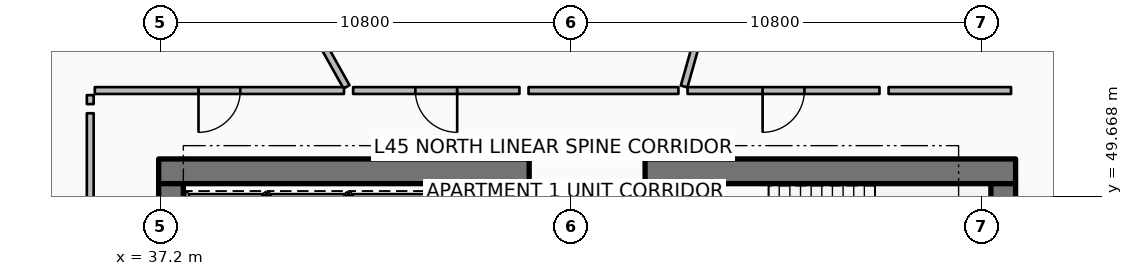
"""IFC4 building model, lengths in metres.
Left out: names, types, materials, properties, quantities, classifications, styles, units other than length and angle.
Written with IfcOpenShell. Run it as: python <this file> out.ifc"""

import sys

from ifc_helpers import new_model, si_unit, direction, frame, frame_2d, origin, place, context, subcontext, project, spatial, rectangle, extrude, element, fill, save


model = new_model("IFC4")
c1 = context("Model", 3, precision=1e-05, world=origin(), true_north=direction((0.0, 1.0)))
c2 = subcontext(c1, "Body", "Model", "MODEL_VIEW")
j1 = project(units=[si_unit("LENGTHUNIT", "METRE"), si_unit("PLANEANGLEUNIT", "RADIAN")], contexts=[c1])
p1 = place(None, origin())
s1 = spatial("IfcSite", under=j1, at=p1, CompositionType="ELEMENT")
p2 = place(p1, origin())
s2 = spatial("IfcBuilding", under=s1, at=p2, CompositionType="ELEMENT")
p3 = place(p2, frame((0.0, 0.0, 180.3)))
s3 = spatial("IfcBuildingStorey", under=s2, at=p3, CompositionType="ELEMENT", Elevation=180.3)
for number, where, z_axis, x_axis in (
    (1, (37.15, 50.325, 0.0), (0.0, 0.0, 1.0), (1.0, 0.0, 0.0)),
    (2, (49.95, 50.325, 0.0), (0.0, 0.0, 1.0), (1.0, 0.0, 0.0)),
):
    element("IfcWall", number, at=place(p3, frame(where, z_axis=z_axis, x_axis=x_axis)), inside=s3, PredefinedType="SHEAR", context=c2, shape_type="SweptSolid", body=[
        extrude(rectangle(XDim=9.75, YDim=0.65, at=frame_2d((4.875, 0.0))), origin(), (0.0, 0.0, 1.0), 3.75),
    ])
for number, where, z_axis, x_axis in (
    (3, (37.475, 34.0, 0.0), (0.0, 0.0, 1.0), (0.0, 1.0, 0.0)),
    (4, (59.375, 34.0, 0.0), (0.0, 0.0, 1.0), (0.0, 1.0, 0.0)),
):
    element("IfcWall", number, at=place(p3, frame(where, z_axis=z_axis, x_axis=x_axis)), inside=s3, PredefinedType="SHEAR", context=c2, shape_type="SweptSolid", body=[
        extrude(rectangle(XDim=16.0, YDim=0.65, at=frame_2d((8.0, 0.0))), origin(), (0.0, 0.0, 1.0), 3.75),
    ])
p4 = place(p3, frame((51.31, 46.5, 0.0), z_axis=(0.0, 0.0, 1.0), x_axis=(0.0, 1.0, 0.0)))
e5 = element("IfcWall", 5, at=p4, inside=s3, PredefinedType="SHEAR", context=c2, shape_type="SweptSolid", body=[
    extrude(rectangle(XDim=3.5, YDim=0.28, at=frame_2d((1.75, 0.0))), origin(), (0.0, 0.0, 1.0), 3.75),
])
for number, where, z_axis, x_axis in (
    (6, (39.975, 48.095, 0.0), (0.0, 0.0, 1.0), (0.0, 1.0, 0.0)),
    (7, (42.125, 48.095, 0.0), (0.0, 0.0, 1.0), (0.0, 1.0, 0.0)),
    (8, (44.275, 48.095, 0.0), (0.0, 0.0, 1.0), (0.0, 1.0, 0.0)),
):
    element("IfcWall", number, at=place(p3, frame(where, z_axis=z_axis, x_axis=x_axis)), inside=s3, PredefinedType="PARTITIONING", context=c2, shape_type="SweptSolid", body=[
        extrude(rectangle(XDim=1.61, YDim=0.16, at=frame_2d((0.805, 0.0))), origin(), (0.0, 0.0, 1.0), 3.5),
    ])
p5 = place(p3, frame((46.58, 48.045, 0.0), z_axis=(0.0, 0.0, 1.0), x_axis=(0.0, 1.0, 0.0)))
e9 = element("IfcWall", 9, at=p5, inside=s3, PredefinedType="PARTITIONING", context=c2, shape_type="SweptSolid", body=[
    extrude(rectangle(XDim=1.71, YDim=0.16, at=frame_2d((0.855, 0.0))), origin(), (0.0, 0.0, 1.0), 3.5),
])
p6 = place(p3, frame((50.977, 52.556, 0.0), z_axis=(0.0, 0.0, 1.0), x_axis=(0.271443307373, 0.962454430548, 0.0)))
e10 = element("IfcWall", 10, at=p6, inside=s3, PredefinedType="PARTITIONING", context=c2, shape_type="SweptSolid", body=[
    extrude(rectangle(XDim=13.759, YDim=0.18, at=frame_2d((6.88, 0.0))), origin(), (0.0, 0.0, 1.0), 2.94),
])
p7 = place(p3, frame((42.094, 52.546, 0.0), z_axis=(0.0, 0.0, 1.0), x_axis=(-0.488614041717, 0.872500039104, 0.0)))
e11 = element("IfcWall", 11, at=p7, inside=s3, PredefinedType="PARTITIONING", context=c2, shape_type="SweptSolid", body=[
    extrude(rectangle(XDim=10.448, YDim=0.18, at=frame_2d((5.224, 0.0))), origin(), (0.0, 0.0, 1.0), 2.94),
])
p8 = place(p3, frame((46.643, 52.45, 0.0), z_axis=(0.0, 0.0, 1.0), x_axis=(-1.0, 0.0, 0.0)))
e12 = element("IfcWall", 12, at=p8, inside=s3, PredefinedType="PARTITIONING", context=c2, shape_type="SweptSolid", body=[
    extrude(rectangle(XDim=4.376, YDim=0.18, at=frame_2d((2.188, 0.0))), origin(), (0.0, 0.0, 1.0), 2.94),
])
p9 = place(p8, frame((1.638, 0.0, 0.0)))
e13 = element("IfcOpeningElement", 13, at=p9, cuts=e12, PredefinedType="OPENING", context=c2, shape_type="SweptSolid", body=[
    extrude(rectangle(XDim=1.1, YDim=2.1, at=frame_2d((0.55, 1.05))), frame((0.0, 0.1, 0.0), z_axis=(0.0, -1.0, 0.0), x_axis=(1.0, 0.0, 0.0)), (0.0, 0.0, 1.0), 0.2),
])
p10 = place(p3, frame((50.827, 52.45, 0.0), z_axis=(0.0, 0.0, 1.0), x_axis=(-1.0, 0.0, 0.0)))
e14 = element("IfcWall", 14, at=p10, inside=s3, PredefinedType="PARTITIONING", context=c2, shape_type="SweptSolid", body=[
    extrude(rectangle(XDim=3.944, YDim=0.18, at=frame_2d((1.972, 0.0))), origin(), (0.0, 0.0, 1.0), 2.94),
])
p11 = place(p3, frame((42.028, 52.45, 0.0), z_axis=(0.0, 0.0, 1.0), x_axis=(-1.0, 0.0, 0.0)))
e15 = element("IfcWall", 15, at=p11, inside=s3, PredefinedType="PARTITIONING", context=c2, shape_type="SweptSolid", body=[
    extrude(rectangle(XDim=6.558, YDim=0.18, at=frame_2d((3.279, 0.0))), origin(), (0.0, 0.0, 1.0), 2.94),
])
p12 = place(p11, frame((2.729, 0.0, 0.0)))
e16 = element("IfcOpeningElement", 16, at=p12, cuts=e15, PredefinedType="OPENING", context=c2, shape_type="SweptSolid", body=[
    extrude(rectangle(XDim=1.1, YDim=2.1, at=frame_2d((0.55, 1.05))), frame((0.0, 0.1, 0.0), z_axis=(0.0, -1.0, 0.0), x_axis=(1.0, 0.0, 0.0)), (0.0, 0.0, 1.0), 0.2),
])
p13 = place(p3, frame((35.35, 52.33, 0.0), z_axis=(0.0, 0.0, 1.0), x_axis=(0.0, -1.0, 0.0)))
e17 = element("IfcWall", 17, at=p13, inside=s3, PredefinedType="PARTITIONING", context=c2, shape_type="SweptSolid", body=[
    extrude(rectangle(XDim=0.238, YDim=0.18, at=frame_2d((0.119, 0.0))), origin(), (0.0, 0.0, 1.0), 2.94),
])
p14 = place(p3, frame((35.35, 51.853, 0.0), z_axis=(0.0, 0.0, 1.0), x_axis=(0.0, -1.0, 0.0)))
e18 = element("IfcWall", 18, at=p14, inside=s3, PredefinedType="PARTITIONING", context=c2, shape_type="SweptSolid", body=[
    extrude(rectangle(XDim=6.165, YDim=0.18, at=frame_2d((3.083, 0.0))), origin(), (0.0, 0.0, 1.0), 2.94),
])
p15 = place(p3, frame((56.118, 52.45, 0.0), z_axis=(0.0, 0.0, 1.0), x_axis=(-1.0, 0.0, 0.0)))
e19 = element("IfcWall", 19, at=p15, inside=s3, PredefinedType="PARTITIONING", context=c2, shape_type="SweptSolid", body=[
    extrude(rectangle(XDim=5.051, YDim=0.18, at=frame_2d((2.525, 0.0))), origin(), (0.0, 0.0, 1.0), 2.94),
])
p16 = place(p15, frame((1.975, 0.0, 0.0)))
e20 = element("IfcOpeningElement", 20, at=p16, cuts=e19, PredefinedType="OPENING", context=c2, shape_type="SweptSolid", body=[
    extrude(rectangle(XDim=1.1, YDim=2.1, at=frame_2d((0.55, 1.05))), frame((0.0, 0.1, 0.0), z_axis=(0.0, -1.0, 0.0), x_axis=(1.0, 0.0, 0.0)), (0.0, 0.0, 1.0), 0.2),
])
p17 = place(p3, frame((59.58, 52.45, 0.0), z_axis=(0.0, 0.0, 1.0), x_axis=(-1.0, 0.0, 0.0)))
e21 = element("IfcWall", 21, at=p17, inside=s3, PredefinedType="PARTITIONING", context=c2, shape_type="SweptSolid", body=[
    extrude(rectangle(XDim=3.222, YDim=0.18, at=frame_2d((1.611, 0.0))), origin(), (0.0, 0.0, 1.0), 2.94),
])
p18 = place(p9, origin())
e22 = element("IfcDoor", 22, at=p18, inside=s3, OperationType="SINGLE_SWING_LEFT", PredefinedType="DOOR", context=c2, shape_type="SweptSolid", body=[
    extrude(rectangle(XDim=1.1, YDim=2.1, at=frame_2d((0.55, 1.05))), frame((0.0, 0.025, 0.0), z_axis=(0.0, -1.0, 0.0), x_axis=(1.0, 0.0, 0.0)), (0.0, 0.0, 1.0), 0.05),
])
fill(e13, e22)
p19 = place(p12, origin())
e23 = element("IfcDoor", 23, at=p19, inside=s3, OperationType="SINGLE_SWING_RIGHT", PredefinedType="DOOR", context=c2, shape_type="SweptSolid", body=[
    extrude(rectangle(XDim=1.1, YDim=2.1, at=frame_2d((0.55, 1.05))), frame((0.0, 0.025, 0.0), z_axis=(0.0, -1.0, 0.0), x_axis=(1.0, 0.0, 0.0)), (0.0, 0.0, 1.0), 0.05),
])
fill(e16, e23)
p20 = place(p16, origin())
e24 = element("IfcDoor", 24, at=p20, inside=s3, OperationType="SINGLE_SWING_RIGHT", PredefinedType="DOOR", context=c2, shape_type="SweptSolid", body=[
    extrude(rectangle(XDim=1.1, YDim=2.1, at=frame_2d((0.55, 1.05))), frame((0.0, 0.025, 0.0), z_axis=(0.0, -1.0, 0.0), x_axis=(1.0, 0.0, 0.0)), (0.0, 0.0, 1.0), 0.05),
])
fill(e20, e24)
save(model, sys.argv[1])
